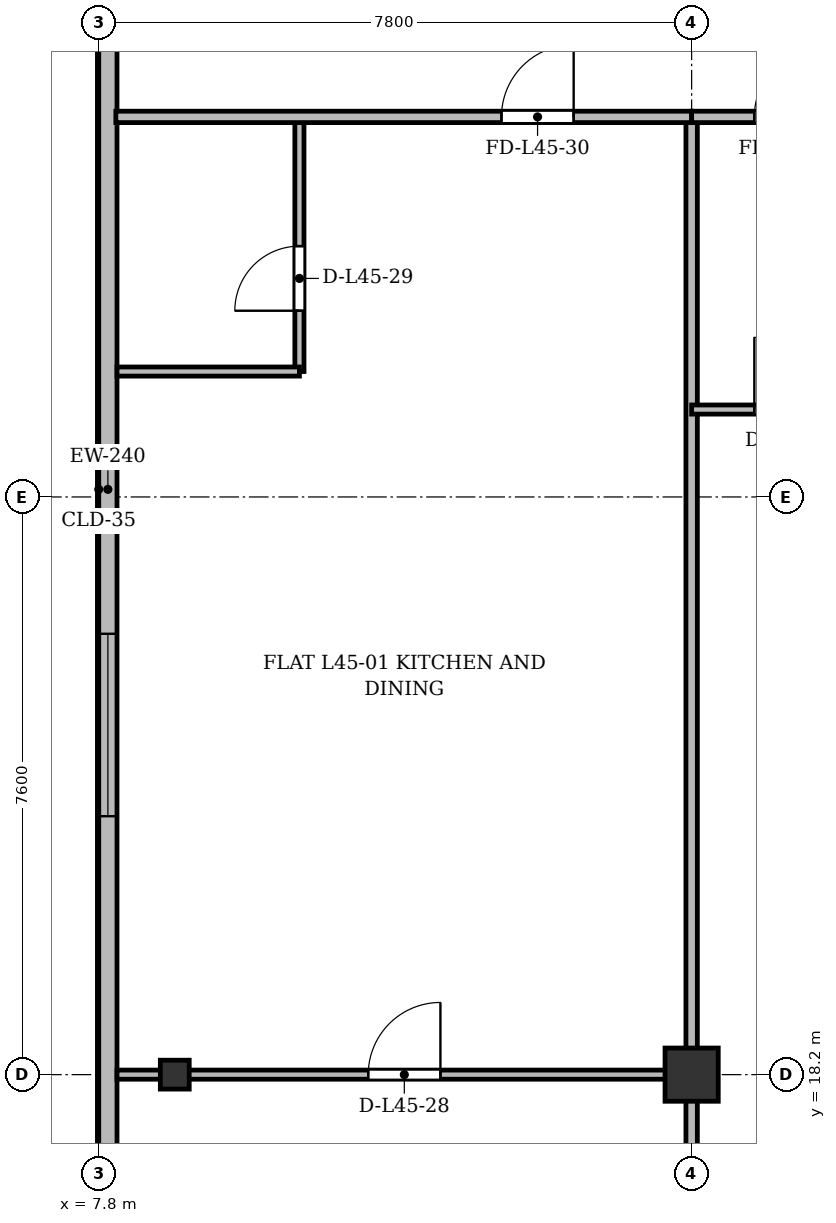
"""IFC4 building model, lengths in metres.
Left out: names, types, materials, properties, quantities, classifications, styles, units other than length and angle.
Written with IfcOpenShell. Run it as: python <this file> out.ifc"""

import sys

from ifc_helpers import new_model, si_unit, direction, frame, frame_2d, origin, origin_2d, place, context, subcontext, project, spatial, rectangle, i_section, extrude, source, transform, mapped, element, fill, save


model = new_model("IFC4")
c1 = context("Model", 3, precision=1e-05, world=origin(), true_north=direction((0.0, 1.0)))
c2 = subcontext(c1, "Body", "Model", "MODEL_VIEW")
j1 = project(units=[si_unit("LENGTHUNIT", "METRE"), si_unit("PLANEANGLEUNIT", "RADIAN")], contexts=[c1])
p1 = place(None, origin())
s1 = spatial("IfcSite", under=j1, at=p1, CompositionType="ELEMENT")
p2 = place(p1, origin())
s2 = spatial("IfcBuilding", under=s1, at=p2, CompositionType="ELEMENT")
p3 = place(p2, frame((0.0, 0.0, 171.7)))
s3 = spatial("IfcBuildingStorey", under=s2, at=p3, CompositionType="ELEMENT", Elevation=171.7)
m1 = source(origin(), c2, "Body", "SweptSolid", [
    extrude(i_section(OverallWidth=0.38, OverallDepth=0.38, WebThickness=0.02, FlangeThickness=0.03, at=origin_2d()), origin(), (0.0, 0.0, 1.0), 3.6),
])
p4 = place(p3, frame((8.8, 18.2, 0.0), z_axis=(0.0, 0.0, 1.0), x_axis=(1.0, 0.0, 0.0)))
e1 = element("IfcColumn", 1, at=p4, inside=s3, PredefinedType="COLUMN", context=c2, shape_type="MappedRepresentation", body=[
    mapped(m1, transform((0.0, 0.0, 0.0), x_axis=(1.0, 0.0, 0.0), y_axis=(0.0, 1.0, 0.0), z_axis=(0.0, 0.0, 1.0), scale=1.0)),
])
m2 = source(origin(), c2, "Body", "SweptSolid", [
    extrude(rectangle(XDim=0.7, YDim=0.7, at=origin_2d()), origin(), (0.0, 0.0, 1.0), 3.6),
])
p5 = place(p3, frame((15.6, 18.2, 0.0), z_axis=(0.0, 0.0, 1.0), x_axis=(1.0, 0.0, 0.0)))
e2 = element("IfcColumn", 2, at=p5, inside=s3, PredefinedType="COLUMN", context=c2, shape_type="MappedRepresentation", body=[
    mapped(m2, transform((0.0, 0.0, 0.0), x_axis=(1.0, 0.0, 0.0), y_axis=(0.0, 1.0, 0.0), z_axis=(0.0, 0.0, 1.0), scale=1.0)),
])
p6 = place(p3, frame((7.92, 6.3, 0.0), z_axis=(0.0, 0.0, 1.0), x_axis=(0.0, 1.0, 0.0)))
e3 = element("IfcWall", 3, at=p6, inside=s3, PredefinedType="SOLIDWALL", context=c2, shape_type="SweptSolid", body=[
    extrude(rectangle(XDim=39.2, YDim=0.24, at=frame_2d((19.6, 0.0))), origin(), (0.0, 0.0, 1.0), 3.35),
])
p7 = place(p6, frame((1.45, 0.0, 0.92)))
e4 = element("IfcOpeningElement", 4, at=p7, cuts=e3, PredefinedType="OPENING", context=c2, shape_type="SweptSolid", body=[
    extrude(rectangle(XDim=1.2, YDim=1.65, at=frame_2d((0.6, 0.825))), frame((0.0, 0.13, 0.0), z_axis=(0.0, -1.0, 0.0), x_axis=(1.0, 0.0, 0.0)), (0.0, 0.0, 1.0), 0.26),
])
p8 = place(p6, frame((3.9, 0.0, 0.92)))
e5 = element("IfcOpeningElement", 5, at=p8, cuts=e3, PredefinedType="OPENING", context=c2, shape_type="SweptSolid", body=[
    extrude(rectangle(XDim=2.4, YDim=2.1, at=frame_2d((1.2, 1.05))), frame((0.0, 0.13, 0.0), z_axis=(0.0, -1.0, 0.0), x_axis=(1.0, 0.0, 0.0)), (0.0, 0.0, 1.0), 0.26),
])
p9 = place(p6, frame((8.1, 0.0, 0.92)))
e6 = element("IfcOpeningElement", 6, at=p9, cuts=e3, PredefinedType="OPENING", context=c2, shape_type="SweptSolid", body=[
    extrude(rectangle(XDim=2.4, YDim=2.1, at=frame_2d((1.2, 1.05))), frame((0.0, 0.13, 0.0), z_axis=(0.0, -1.0, 0.0), x_axis=(1.0, 0.0, 0.0)), (0.0, 0.0, 1.0), 0.26),
])
p10 = place(p6, frame((15.3, 0.0, 0.92)))
e7 = element("IfcOpeningElement", 7, at=p10, cuts=e3, PredefinedType="OPENING", context=c2, shape_type="SweptSolid", body=[
    extrude(rectangle(XDim=2.4, YDim=2.1, at=frame_2d((1.2, 1.05))), frame((0.0, 0.13, 0.0), z_axis=(0.0, -1.0, 0.0), x_axis=(1.0, 0.0, 0.0)), (0.0, 0.0, 1.0), 0.26),
])
p11 = place(p6, frame((33.5, 0.0, 0.92)))
e8 = element("IfcOpeningElement", 8, at=p11, cuts=e3, PredefinedType="OPENING", context=c2, shape_type="SweptSolid", body=[
    extrude(rectangle(XDim=1.2, YDim=1.65, at=frame_2d((0.6, 0.825))), frame((0.0, 0.13, 0.0), z_axis=(0.0, -1.0, 0.0), x_axis=(1.0, 0.0, 0.0)), (0.0, 0.0, 1.0), 0.26),
])
p12 = place(p6, frame((36.85, 0.0, 0.92)))
e9 = element("IfcOpeningElement", 9, at=p12, cuts=e3, PredefinedType="OPENING", context=c2, shape_type="SweptSolid", body=[
    extrude(rectangle(XDim=1.2, YDim=1.65, at=frame_2d((0.6, 0.825))), frame((0.0, 0.13, 0.0), z_axis=(0.0, -1.0, 0.0), x_axis=(1.0, 0.0, 0.0)), (0.0, 0.0, 1.0), 0.26),
])
p13 = place(p3, frame((15.6, 3.525, 0.0), z_axis=(0.0, 0.0, 1.0), x_axis=(0.0, 1.0, 0.0)))
e10 = element("IfcWall", 10, at=p13, inside=s3, PredefinedType="PARTITIONING", context=c2, shape_type="SweptSolid", body=[
    extrude(rectangle(XDim=27.275, YDim=0.15, at=frame_2d((13.638, 0.0))), origin(), (0.0, 0.0, 1.0), 2.85),
])
p14 = place(p3, frame((8.04, 18.2, 0.0), z_axis=(0.0, 0.0, 1.0), x_axis=(1.0, 0.0, 0.0)))
e11 = element("IfcWall", 11, at=p14, inside=s3, PredefinedType="PARTITIONING", context=c2, shape_type="SweptSolid", body=[
    extrude(rectangle(XDim=7.56, YDim=0.12, at=frame_2d((3.78, 0.0))), origin(), (0.0, 0.0, 1.0), 2.75),
])
p15 = place(p14, frame((3.305, 0.0, 0.0)))
e12 = element("IfcOpeningElement", 12, at=p15, cuts=e11, PredefinedType="OPENING", context=c2, shape_type="SweptSolid", body=[
    extrude(rectangle(XDim=0.95, YDim=2.15, at=frame_2d((0.475, 1.075))), frame((0.0, 0.07, 0.0), z_axis=(0.0, -1.0, 0.0), x_axis=(1.0, 0.0, 0.0)), (0.0, 0.0, 1.0), 0.14),
])
p16 = place(p3, frame((10.44, 27.45, 0.0), z_axis=(0.0, 0.0, 1.0), x_axis=(0.0, 1.0, 0.0)))
e13 = element("IfcWall", 13, at=p16, inside=s3, PredefinedType="PARTITIONING", context=c2, shape_type="SweptSolid", body=[
    extrude(rectangle(XDim=3.35, YDim=0.12, at=frame_2d((1.675, 0.0))), origin(), (0.0, 0.0, 1.0), 3.35),
])
p17 = place(p16, frame((0.8, 0.0, 0.0)))
e14 = element("IfcOpeningElement", 14, at=p17, cuts=e13, PredefinedType="OPENING", context=c2, shape_type="SweptSolid", body=[
    extrude(rectangle(XDim=0.85, YDim=2.1, at=frame_2d((0.425, 1.05))), frame((0.0, 0.07, 0.0), z_axis=(0.0, -1.0, 0.0), x_axis=(1.0, 0.0, 0.0)), (0.0, 0.0, 1.0), 0.14),
])
p18 = place(p3, frame((8.04, 27.45, 0.0), z_axis=(0.0, 0.0, 1.0), x_axis=(1.0, 0.0, 0.0)))
e15 = element("IfcWall", 15, at=p18, inside=s3, PredefinedType="PARTITIONING", context=c2, shape_type="SweptSolid", body=[
    extrude(rectangle(XDim=2.4, YDim=0.12, at=frame_2d((1.2, 0.0))), origin(), (0.0, 0.0, 1.0), 2.85),
])
p19 = place(p3, frame((8.025, 30.8, 0.0), z_axis=(0.0, 0.0, 1.0), x_axis=(1.0, 0.0, 0.0)))
e16 = element("IfcWall", 16, at=p19, inside=s3, PredefinedType="PARTITIONING", context=c2, shape_type="SweptSolid", body=[
    extrude(rectangle(XDim=7.575, YDim=0.15, at=frame_2d((3.788, 0.0))), origin(), (0.0, 0.0, 1.0), 2.85),
])
p20 = place(p19, frame((5.073, 0.0, 0.0)))
e17 = element("IfcOpeningElement", 17, at=p20, cuts=e16, PredefinedType="OPENING", context=c2, shape_type="SweptSolid", body=[
    extrude(rectangle(XDim=0.95, YDim=2.15, at=frame_2d((0.475, 1.075))), frame((0.0, 0.085, 0.0), z_axis=(0.0, -1.0, 0.0), x_axis=(1.0, 0.0, 0.0)), (0.0, 0.0, 1.0), 0.17),
])
p21 = place(p3, frame((15.6, 30.8, 0.0), z_axis=(0.0, 0.0, 1.0), x_axis=(1.0, 0.0, 0.0)))
e18 = element("IfcWall", 18, at=p21, inside=s3, PredefinedType="PARTITIONING", context=c2, shape_type="SweptSolid", body=[
    extrude(rectangle(XDim=2.6, YDim=0.15, at=frame_2d((1.3, 0.0))), origin(), (0.0, 0.0, 1.0), 2.85),
])
p22 = place(p21, frame((0.825, 0.0, 0.0)))
e19 = element("IfcOpeningElement", 19, at=p22, cuts=e18, PredefinedType="OPENING", context=c2, shape_type="SweptSolid", body=[
    extrude(rectangle(XDim=0.95, YDim=2.15, at=frame_2d((0.475, 1.075))), frame((0.0, 0.085, 0.0), z_axis=(0.0, -1.0, 0.0), x_axis=(1.0, 0.0, 0.0)), (0.0, 0.0, 1.0), 0.17),
])
p23 = place(p3, frame((15.6, 26.95, 0.0), z_axis=(0.0, 0.0, 1.0), x_axis=(1.0, 0.0, 0.0)))
e20 = element("IfcWall", 20, at=p23, inside=s3, PredefinedType="PARTITIONING", context=c2, shape_type="SweptSolid", body=[
    extrude(rectangle(XDim=2.6, YDim=0.12, at=frame_2d((1.3, 0.0))), origin(), (0.0, 0.0, 1.0), 2.85),
])
p24 = place(p23, frame((0.825, 0.0, 0.0)))
e21 = element("IfcOpeningElement", 21, at=p24, cuts=e20, PredefinedType="OPENING", context=c2, shape_type="SweptSolid", body=[
    extrude(rectangle(XDim=0.95, YDim=2.15, at=frame_2d((0.475, 1.075))), frame((0.0, 0.07, 0.0), z_axis=(0.0, -1.0, 0.0), x_axis=(1.0, 0.0, 0.0)), (0.0, 0.0, 1.0), 0.14),
])
m3 = source(origin(), c2, "Body", "SweptSolid", [
    extrude(rectangle(XDim=2.4, YDim=2.1, at=frame_2d((1.2, 1.05))), frame((0.0, 0.03, 0.0), z_axis=(0.0, -1.0, 0.0), x_axis=(1.0, 0.0, 0.0)), (0.0, 0.0, 1.0), 0.06),
])
p25 = place(p10, origin())
e22 = element("IfcWindow", 22, at=p25, inside=s3, PartitioningType="SINGLE_PANEL", PredefinedType="WINDOW", context=c2, shape_type="MappedRepresentation", body=[
    mapped(m3, transform((0.0, 0.0, 0.0), x_axis=(1.0, 0.0, 0.0), y_axis=(0.0, 1.0, 0.0), z_axis=(0.0, 0.0, 1.0), scale=1.0)),
])
fill(e7, e22)
m4 = source(origin(), c2, "Body", "SweptSolid", [
    extrude(rectangle(XDim=0.95, YDim=2.15, at=frame_2d((0.475, 1.075))), frame((0.0, 0.025, 0.0), z_axis=(0.0, -1.0, 0.0), x_axis=(1.0, 0.0, 0.0)), (0.0, 0.0, 1.0), 0.05),
])
p26 = place(p15, origin())
e23 = element("IfcDoor", 23, at=p26, inside=s3, OperationType="SINGLE_SWING_RIGHT", PredefinedType="DOOR", context=c2, shape_type="MappedRepresentation", body=[
    mapped(m4, transform((0.0, 0.0, 0.0), x_axis=(1.0, 0.0, 0.0), y_axis=(0.0, 1.0, 0.0), z_axis=(0.0, 0.0, 1.0), scale=1.0)),
])
fill(e12, e23)
m5 = source(origin(), c2, "Body", "SweptSolid", [
    extrude(rectangle(XDim=0.85, YDim=2.1, at=frame_2d((0.425, 1.05))), frame((0.0, 0.025, 0.0), z_axis=(0.0, -1.0, 0.0), x_axis=(1.0, 0.0, 0.0)), (0.0, 0.0, 1.0), 0.05),
])
p27 = place(p17, origin())
e24 = element("IfcDoor", 24, at=p27, inside=s3, OperationType="SINGLE_SWING_LEFT", PredefinedType="DOOR", context=c2, shape_type="MappedRepresentation", body=[
    mapped(m5, transform((0.0, 0.0, 0.0), x_axis=(1.0, 0.0, 0.0), y_axis=(0.0, 1.0, 0.0), z_axis=(0.0, 0.0, 1.0), scale=1.0)),
])
fill(e14, e24)
p28 = place(p20, origin())
e25 = element("IfcDoor", 25, at=p28, inside=s3, OperationType="SINGLE_SWING_RIGHT", PredefinedType="DOOR", context=c2, shape_type="MappedRepresentation", body=[
    mapped(m4, transform((0.0, 0.0, 0.0), x_axis=(1.0, 0.0, 0.0), y_axis=(0.0, 1.0, 0.0), z_axis=(0.0, 0.0, 1.0), scale=1.0)),
])
fill(e17, e25)
p29 = place(p22, origin())
e26 = element("IfcDoor", 26, at=p29, inside=s3, OperationType="SINGLE_SWING_RIGHT", PredefinedType="DOOR", context=c2, shape_type="MappedRepresentation", body=[
    mapped(m4, transform((0.0, 0.0, 0.0), x_axis=(1.0, 0.0, 0.0), y_axis=(0.0, 1.0, 0.0), z_axis=(0.0, 0.0, 1.0), scale=1.0)),
])
fill(e19, e26)
p30 = place(p24, origin())
e27 = element("IfcDoor", 27, at=p30, inside=s3, OperationType="SINGLE_SWING_LEFT", PredefinedType="DOOR", context=c2, shape_type="MappedRepresentation", body=[
    mapped(m4, transform((0.0, 0.0, 0.0), x_axis=(1.0, 0.0, 0.0), y_axis=(0.0, 1.0, 0.0), z_axis=(0.0, 0.0, 1.0), scale=1.0)),
])
fill(e21, e27)
save(model, sys.argv[1])
